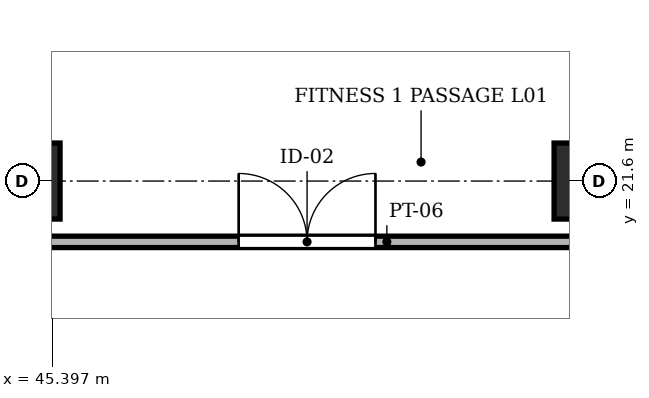
"""IFC4 building model, lengths in metres.
Left out: names, types, materials, properties, quantities, classifications, styles, units other than length and angle.
Written with IfcOpenShell. Run it as: python <this file> out.ifc"""

import sys

from ifc_helpers import new_model, si_unit, direction, frame, frame_2d, origin, origin_2d, place, context, subcontext, project, spatial, rectangle, extrude, element, fill, save


model = new_model("IFC4")
c1 = context("Model", 3, precision=1e-05, world=origin(), true_north=direction((0.0, 1.0)))
c2 = subcontext(c1, "Body", "Model", "MODEL_VIEW")
j1 = project(units=[si_unit("LENGTHUNIT", "METRE"), si_unit("PLANEANGLEUNIT", "RADIAN")], contexts=[c1])
p1 = place(None, origin())
s1 = spatial("IfcSite", under=j1, at=p1, CompositionType="ELEMENT")
p2 = place(p1, origin())
s2 = spatial("IfcBuilding", under=s1, at=p2, CompositionType="ELEMENT")
p3 = place(p2, frame((0.0, 0.0, 4.6)))
s3 = spatial("IfcBuildingStorey", under=s2, at=p3, CompositionType="ELEMENT", Elevation=4.6)
for number, where, z_axis, x_axis in (
    (1, (45.0, 21.6, -0.3), (0.0, 0.0, 1.0), (1.0, 0.0, 0.0)),
    (2, (52.5, 21.6, -0.3), (0.0, 0.0, 1.0), (1.0, 0.0, 0.0)),
):
    element("IfcColumn", number, at=place(p3, frame(where, z_axis=z_axis, x_axis=x_axis)), inside=s3, PredefinedType="COLUMN", context=c2, shape_type="SweptSolid", body=[
        extrude(rectangle(XDim=1.0, YDim=1.0, at=origin_2d()), origin(), (0.0, 0.0, 1.0), 4.65),
    ])
p4 = place(p3, frame((38.3, 20.8, 0.0), z_axis=(0.0, 0.0, 1.0), x_axis=(1.0, 0.0, 0.0)))
e3 = element("IfcWall", 3, at=p4, inside=s3, PredefinedType="PARTITIONING", context=c2, shape_type="SweptSolid", body=[
    extrude(rectangle(XDim=28.9, YDim=0.15, at=frame_2d((14.45, 0.0))), origin(), (0.0, 0.0, 1.0), 4.08),
])
p5 = place(p4, frame((9.55, 0.0, 0.0)))
e4 = element("IfcOpeningElement", 4, at=p5, cuts=e3, PredefinedType="OPENING", context=c2, shape_type="SweptSolid", body=[
    extrude(rectangle(XDim=1.8, YDim=2.25, at=frame_2d((0.9, 1.125))), frame((0.0, 0.087, 0.0), z_axis=(0.0, -1.0, 0.0), x_axis=(1.0, 0.0, 0.0)), (0.0, 0.0, 1.0), 0.174),
])
p6 = place(p5, origin())
e5 = element("IfcDoor", 5, at=p6, inside=s3, OperationType="DOUBLE_DOOR_SINGLE_SWING", PredefinedType="DOOR", context=c2, shape_type="SweptSolid", body=[
    extrude(rectangle(XDim=1.8, YDim=2.25, at=frame_2d((0.9, 1.125))), frame((0.0, 0.025, 0.0), z_axis=(0.0, -1.0, 0.0), x_axis=(1.0, 0.0, 0.0)), (0.0, 0.0, 1.0), 0.05),
])
fill(e4, e5)
save(model, sys.argv[1])
